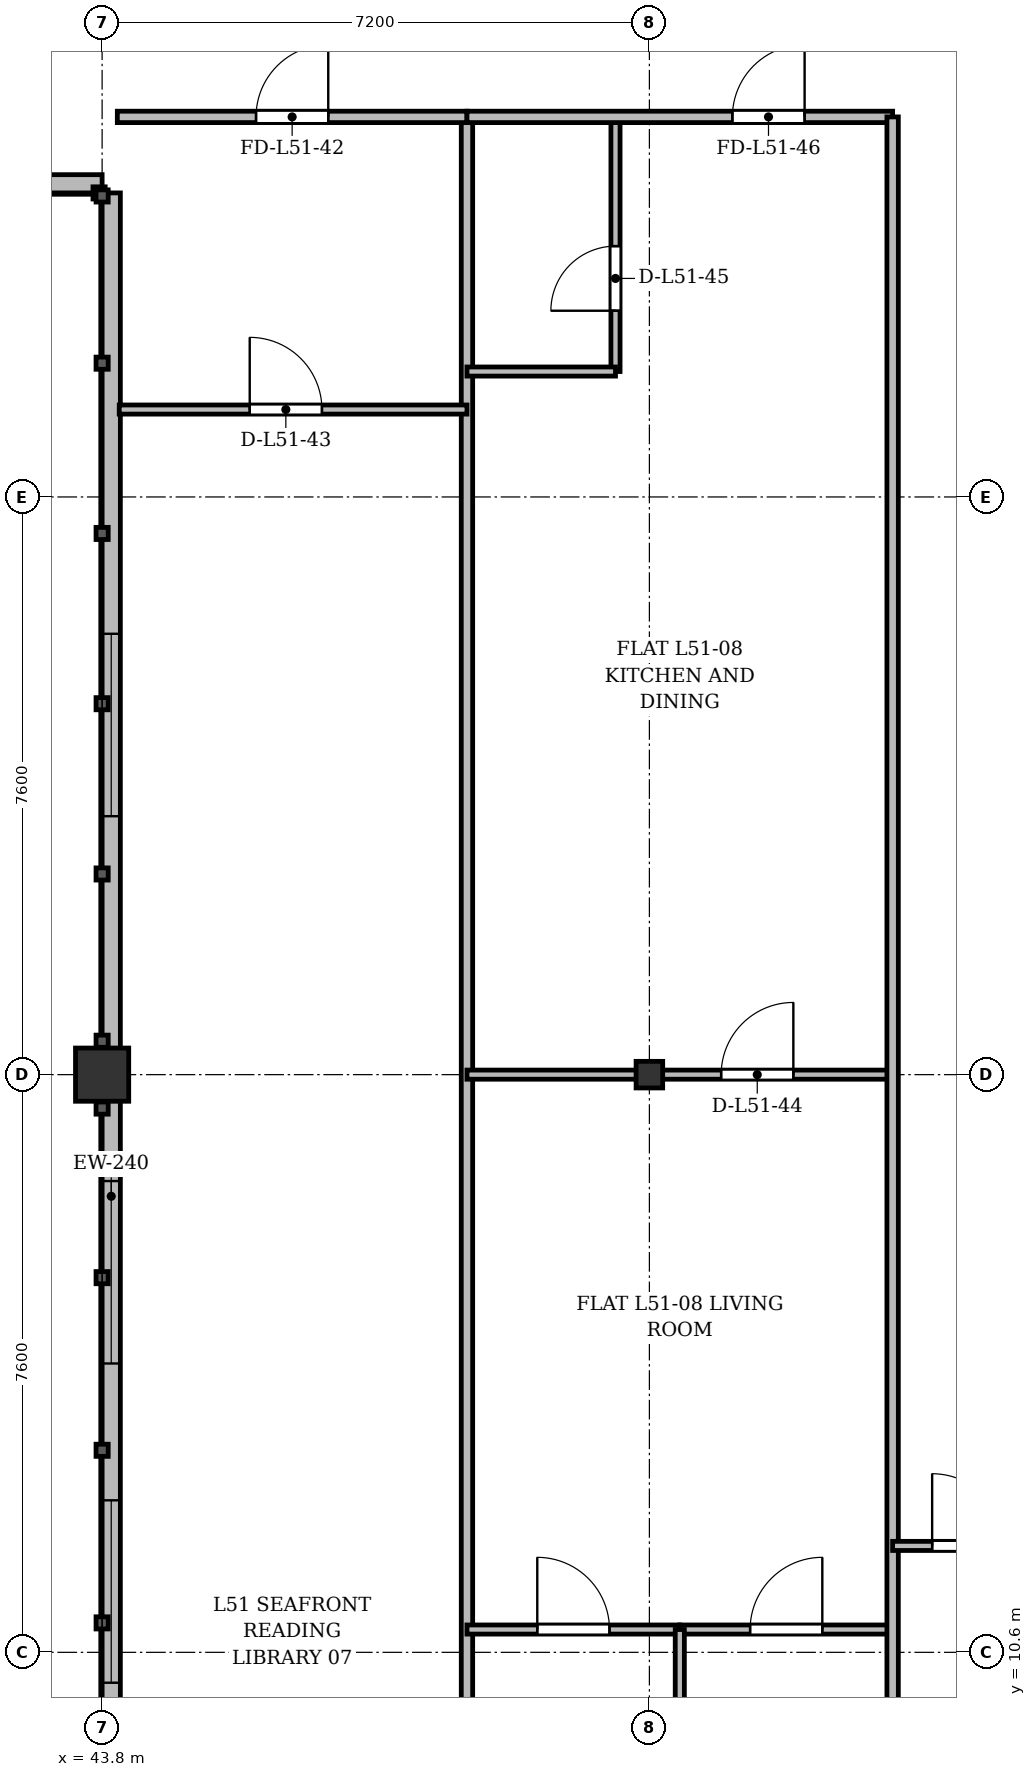
"""IFC4 building model, lengths in metres.
Left out: names, types, materials, properties, quantities, classifications, styles, units other than length and angle.
Written with IfcOpenShell. Run it as: python <this file> out.ifc"""

import sys

from ifc_helpers import new_model, si_unit, direction, frame, frame_2d, origin, origin_2d, place, context, subcontext, project, spatial, rectangle, i_section, extrude, source, transform, mapped, element, fill, save


model = new_model("IFC4")
c1 = context("Model", 3, precision=1e-05, world=origin(), true_north=direction((0.0, 1.0)))
c2 = subcontext(c1, "Body", "Model", "MODEL_VIEW")
j1 = project(units=[si_unit("LENGTHUNIT", "METRE"), si_unit("PLANEANGLEUNIT", "RADIAN")], contexts=[c1])
p1 = place(None, origin())
s1 = spatial("IfcSite", under=j1, at=p1, CompositionType="ELEMENT")
p2 = place(p1, origin())
s2 = spatial("IfcBuilding", under=s1, at=p2, CompositionType="ELEMENT")
p3 = place(p2, frame((0.0, 0.0, 197.7)))
s3 = spatial("IfcBuildingStorey", under=s2, at=p3, CompositionType="ELEMENT", Elevation=197.7)
m1 = source(origin(), c2, "Body", "SweptSolid", [
    extrude(rectangle(XDim=0.7, YDim=0.7, at=origin_2d()), origin(), (0.0, 0.0, 1.0), 3.6),
])
p4 = place(p3, frame((43.8, 18.2, 0.0), z_axis=(0.0, 0.0, 1.0), x_axis=(1.0, 0.0, 0.0)))
e1 = element("IfcColumn", 1, at=p4, inside=s3, PredefinedType="COLUMN", context=c2, shape_type="MappedRepresentation", body=[
    mapped(m1, transform((0.0, 0.0, 0.0), x_axis=(1.0, 0.0, 0.0), y_axis=(0.0, 1.0, 0.0), z_axis=(0.0, 0.0, 1.0), scale=1.0)),
])
m2 = source(origin(), c2, "Body", "SweptSolid", [
    extrude(i_section(OverallWidth=0.35, OverallDepth=0.35, WebThickness=0.018, FlangeThickness=0.028, at=origin_2d()), origin(), (0.0, 0.0, 1.0), 3.6),
])
p5 = place(p3, frame((51.0, 18.2, 0.0), z_axis=(0.0, 0.0, 1.0), x_axis=(1.0, 0.0, 0.0)))
e2 = element("IfcColumn", 2, at=p5, inside=s3, PredefinedType="COLUMN", context=c2, shape_type="MappedRepresentation", body=[
    mapped(m2, transform((0.0, 0.0, 0.0), x_axis=(1.0, 0.0, 0.0), y_axis=(0.0, 1.0, 0.0), z_axis=(0.0, 0.0, 1.0), scale=1.0)),
])
p6 = place(p3, frame((43.92, 3.4, 0.0), z_axis=(0.0, 0.0, 1.0), x_axis=(0.0, 1.0, 0.0)))
e3 = element("IfcWall", 3, at=p6, inside=s3, PredefinedType="SOLIDWALL", context=c2, shape_type="SweptSolid", body=[
    extrude(rectangle(XDim=26.4, YDim=0.24, at=frame_2d((13.2, 0.0))), origin(), (0.0, 0.0, 1.0), 2.86),
])
p7 = place(p6, frame((4.45, 0.0, 0.92)))
e4 = element("IfcOpeningElement", 4, at=p7, cuts=e3, PredefinedType="OPENING", context=c2, shape_type="SweptSolid", body=[
    extrude(rectangle(XDim=1.2, YDim=1.65, at=frame_2d((0.6, 0.825))), frame((0.0, 0.13, 0.0), z_axis=(0.0, -1.0, 0.0), x_axis=(1.0, 0.0, 0.0)), (0.0, 0.0, 1.0), 0.26),
])
p8 = place(p6, frame((6.8, 0.0, 0.92)))
e5 = element("IfcOpeningElement", 5, at=p8, cuts=e3, PredefinedType="OPENING", context=c2, shape_type="SweptSolid", body=[
    extrude(rectangle(XDim=2.4, YDim=1.84, at=frame_2d((1.2, 0.92))), frame((0.0, 0.13, 0.0), z_axis=(0.0, -1.0, 0.0), x_axis=(1.0, 0.0, 0.0)), (0.0, 0.0, 1.0), 0.26),
])
p9 = place(p6, frame((11.0, 0.0, 0.92)))
e6 = element("IfcOpeningElement", 6, at=p9, cuts=e3, PredefinedType="OPENING", context=c2, shape_type="SweptSolid", body=[
    extrude(rectangle(XDim=2.4, YDim=1.84, at=frame_2d((1.2, 0.92))), frame((0.0, 0.13, 0.0), z_axis=(0.0, -1.0, 0.0), x_axis=(1.0, 0.0, 0.0)), (0.0, 0.0, 1.0), 0.26),
])
p10 = place(p6, frame((18.2, 0.0, 0.92)))
e7 = element("IfcOpeningElement", 7, at=p10, cuts=e3, PredefinedType="OPENING", context=c2, shape_type="SweptSolid", body=[
    extrude(rectangle(XDim=2.4, YDim=1.84, at=frame_2d((1.2, 0.92))), frame((0.0, 0.13, 0.0), z_axis=(0.0, -1.0, 0.0), x_axis=(1.0, 0.0, 0.0)), (0.0, 0.0, 1.0), 0.26),
])
p11 = place(p3, frame((43.8, 29.92, 0.0), z_axis=(0.0, 0.0, 1.0), x_axis=(-1.0, 0.0, 0.0)))
e8 = element("IfcWall", 8, at=p11, inside=s3, PredefinedType="SOLIDWALL", context=c2, shape_type="SweptSolid", body=[
    extrude(rectangle(XDim=13.2, YDim=0.24, at=frame_2d((6.6, 0.0))), origin(), (0.0, 0.0, 1.0), 2.86),
])
p12 = place(p11, frame((5.5, 0.0, 0.9)))
e9 = element("IfcOpeningElement", 9, at=p12, cuts=e8, PredefinedType="OPENING", context=c2, shape_type="SweptSolid", body=[
    extrude(rectangle(XDim=2.2, YDim=1.8, at=frame_2d((1.1, 0.9))), frame((0.0, 0.13, 0.0), z_axis=(0.0, -1.0, 0.0), x_axis=(1.0, 0.0, 0.0)), (0.0, 0.0, 1.0), 0.26),
])
p13 = place(p3, frame((48.6, 3.625, 0.0), z_axis=(0.0, 0.0, 1.0), x_axis=(0.0, 1.0, 0.0)))
e10 = element("IfcWall", 10, at=p13, inside=s3, PredefinedType="PARTITIONING", context=c2, shape_type="SweptSolid", body=[
    extrude(rectangle(XDim=27.175, YDim=0.15, at=frame_2d((13.587, 0.0))), origin(), (0.0, 0.0, 1.0), 2.91),
])
p14 = place(p3, frame((44.0, 30.8, 0.0), z_axis=(0.0, 0.0, 1.0), x_axis=(1.0, 0.0, 0.0)))
e11 = element("IfcWall", 11, at=p14, inside=s3, PredefinedType="PARTITIONING", context=c2, shape_type="SweptSolid", body=[
    extrude(rectangle(XDim=4.6, YDim=0.15, at=frame_2d((2.3, 0.0))), origin(), (0.0, 0.0, 1.0), 3.36),
])
p15 = place(p14, frame((1.825, 0.0, 0.0)))
e12 = element("IfcOpeningElement", 12, at=p15, cuts=e11, PredefinedType="OPENING", context=c2, shape_type="SweptSolid", body=[
    extrude(rectangle(XDim=0.95, YDim=2.15, at=frame_2d((0.475, 1.075))), frame((0.0, 0.085, 0.0), z_axis=(0.0, -1.0, 0.0), x_axis=(1.0, 0.0, 0.0)), (0.0, 0.0, 1.0), 0.17),
])
p16 = place(p3, frame((44.025, 26.95, 0.0), z_axis=(0.0, 0.0, 1.0), x_axis=(1.0, 0.0, 0.0)))
e13 = element("IfcWall", 13, at=p16, inside=s3, PredefinedType="PARTITIONING", context=c2, shape_type="SweptSolid", body=[
    extrude(rectangle(XDim=4.575, YDim=0.12, at=frame_2d((2.288, 0.0))), origin(), (0.0, 0.0, 1.0), 3.36),
])
p17 = place(p16, frame((1.717, 0.0, 0.0)))
e14 = element("IfcOpeningElement", 14, at=p17, cuts=e13, PredefinedType="OPENING", context=c2, shape_type="SweptSolid", body=[
    extrude(rectangle(XDim=0.95, YDim=2.15, at=frame_2d((0.475, 1.075))), frame((0.0, 0.07, 0.0), z_axis=(0.0, -1.0, 0.0), x_axis=(1.0, 0.0, 0.0)), (0.0, 0.0, 1.0), 0.14),
])
p18 = place(p3, frame((48.6, 18.2, 0.0), z_axis=(0.0, 0.0, 1.0), x_axis=(1.0, 0.0, 0.0)))
e15 = element("IfcWall", 15, at=p18, inside=s3, PredefinedType="PARTITIONING", context=c2, shape_type="SweptSolid", body=[
    extrude(rectangle(XDim=5.6, YDim=0.12, at=frame_2d((2.8, 0.0))), origin(), (0.0, 0.0, 1.0), 2.91),
])
p19 = place(p18, frame((3.344, 0.0, 0.0)))
e16 = element("IfcOpeningElement", 16, at=p19, cuts=e15, PredefinedType="OPENING", context=c2, shape_type="SweptSolid", body=[
    extrude(rectangle(XDim=0.95, YDim=2.15, at=frame_2d((0.475, 1.075))), frame((0.0, 0.07, 0.0), z_axis=(0.0, -1.0, 0.0), x_axis=(1.0, 0.0, 0.0)), (0.0, 0.0, 1.0), 0.14),
])
p20 = place(p3, frame((50.554, 27.45, 0.0), z_axis=(0.0, 0.0, 1.0), x_axis=(0.0, 1.0, 0.0)))
e17 = element("IfcWall", 17, at=p20, inside=s3, PredefinedType="PARTITIONING", context=c2, shape_type="SweptSolid", body=[
    extrude(rectangle(XDim=3.35, YDim=0.12, at=frame_2d((1.675, 0.0))), origin(), (0.0, 0.0, 1.0), 3.36),
])
p21 = place(p20, frame((0.8, 0.0, 0.0)))
e18 = element("IfcOpeningElement", 18, at=p21, cuts=e17, PredefinedType="OPENING", context=c2, shape_type="SweptSolid", body=[
    extrude(rectangle(XDim=0.85, YDim=2.1, at=frame_2d((0.425, 1.05))), frame((0.0, 0.07, 0.0), z_axis=(0.0, -1.0, 0.0), x_axis=(1.0, 0.0, 0.0)), (0.0, 0.0, 1.0), 0.14),
])
p22 = place(p3, frame((48.6, 27.45, 0.0), z_axis=(0.0, 0.0, 1.0), x_axis=(1.0, 0.0, 0.0)))
e19 = element("IfcWall", 19, at=p22, inside=s3, PredefinedType="PARTITIONING", context=c2, shape_type="SweptSolid", body=[
    extrude(rectangle(XDim=1.954, YDim=0.12, at=frame_2d((0.977, 0.0))), origin(), (0.0, 0.0, 1.0), 3.36),
])
p23 = place(p3, frame((48.6, 30.8, 0.0), z_axis=(0.0, 0.0, 1.0), x_axis=(1.0, 0.0, 0.0)))
e20 = element("IfcWall", 20, at=p23, inside=s3, PredefinedType="PARTITIONING", context=c2, shape_type="SweptSolid", body=[
    extrude(rectangle(XDim=5.6, YDim=0.15, at=frame_2d((2.8, 0.0))), origin(), (0.0, 0.0, 1.0), 2.86),
])
p24 = place(p23, frame((3.492, 0.0, 0.0)))
e21 = element("IfcOpeningElement", 21, at=p24, cuts=e20, PredefinedType="OPENING", context=c2, shape_type="SweptSolid", body=[
    extrude(rectangle(XDim=0.95, YDim=2.15, at=frame_2d((0.475, 1.075))), frame((0.0, 0.085, 0.0), z_axis=(0.0, -1.0, 0.0), x_axis=(1.0, 0.0, 0.0)), (0.0, 0.0, 1.0), 0.17),
])
p25 = place(p3, frame((48.6, 10.9, 0.0), z_axis=(0.0, 0.0, 1.0), x_axis=(1.0, 0.0, 0.0)))
e22 = element("IfcWall", 22, at=p25, inside=s3, PredefinedType="PARTITIONING", context=c2, shape_type="SweptSolid", body=[
    extrude(rectangle(XDim=2.8, YDim=0.12, at=frame_2d((1.4, 0.0))), origin(), (0.0, 0.0, 1.0), 2.86),
])
p26 = place(p25, frame((0.925, 0.0, 0.0)))
e23 = element("IfcOpeningElement", 23, at=p26, cuts=e22, PredefinedType="OPENING", context=c2, shape_type="SweptSolid", body=[
    extrude(rectangle(XDim=0.95, YDim=2.15, at=frame_2d((0.475, 1.075))), frame((0.0, 0.07, 0.0), z_axis=(0.0, -1.0, 0.0), x_axis=(1.0, 0.0, 0.0)), (0.0, 0.0, 1.0), 0.14),
])
p27 = place(p3, frame((51.4, 10.9, 0.0), z_axis=(0.0, 0.0, 1.0), x_axis=(1.0, 0.0, 0.0)))
e24 = element("IfcWall", 24, at=p27, inside=s3, PredefinedType="PARTITIONING", context=c2, shape_type="SweptSolid", body=[
    extrude(rectangle(XDim=2.8, YDim=0.12, at=frame_2d((1.4, 0.0))), origin(), (0.0, 0.0, 1.0), 3.06),
])
p28 = place(p27, frame((0.925, 0.0, 0.0)))
e25 = element("IfcOpeningElement", 25, at=p28, cuts=e24, PredefinedType="OPENING", context=c2, shape_type="SweptSolid", body=[
    extrude(rectangle(XDim=0.95, YDim=2.15, at=frame_2d((0.475, 1.075))), frame((0.0, 0.07, 0.0), z_axis=(0.0, -1.0, 0.0), x_axis=(1.0, 0.0, 0.0)), (0.0, 0.0, 1.0), 0.14),
])
p29 = place(p3, frame((51.4, 3.625, 0.0), z_axis=(0.0, 0.0, 1.0), x_axis=(0.0, 1.0, 0.0)))
e26 = element("IfcWall", 26, at=p29, inside=s3, PredefinedType="PARTITIONING", context=c2, shape_type="SweptSolid", body=[
    extrude(rectangle(XDim=7.275, YDim=0.12, at=frame_2d((3.637, 0.0))), origin(), (0.0, 0.0, 1.0), 2.91),
])
p30 = place(p3, frame((54.2, 3.625, 0.0), z_axis=(0.0, 0.0, 1.0), x_axis=(0.0, 1.0, 0.0)))
e27 = element("IfcWall", 27, at=p30, inside=s3, PredefinedType="PARTITIONING", context=c2, shape_type="SweptSolid", body=[
    extrude(rectangle(XDim=27.175, YDim=0.15, at=frame_2d((13.587, 0.0))), origin(), (0.0, 0.0, 1.0), 2.91),
])
p31 = place(p3, frame((54.2, 12.0, 0.0), z_axis=(0.0, 0.0, 1.0), x_axis=(1.0, 0.0, 0.0)))
e28 = element("IfcWall", 28, at=p31, inside=s3, PredefinedType="PARTITIONING", context=c2, shape_type="SweptSolid", body=[
    extrude(rectangle(XDim=2.0, YDim=0.12, at=frame_2d((1.0, 0.0))), origin(), (0.0, 0.0, 1.0), 3.36),
])
p32 = place(p31, frame((0.52, 0.0, 0.0)))
e29 = element("IfcOpeningElement", 29, at=p32, cuts=e28, PredefinedType="OPENING", context=c2, shape_type="SweptSolid", body=[
    extrude(rectangle(XDim=0.95, YDim=2.15, at=frame_2d((0.475, 1.075))), frame((0.0, 0.07, 0.0), z_axis=(0.0, -1.0, 0.0), x_axis=(1.0, 0.0, 0.0)), (0.0, 0.0, 1.0), 0.14),
])
m3 = source(origin(), c2, "Body", "SweptSolid", [
    extrude(rectangle(XDim=2.4, YDim=1.84, at=frame_2d((1.2, 0.92))), frame((0.0, 0.03, 0.0), z_axis=(0.0, -1.0, 0.0), x_axis=(1.0, 0.0, 0.0)), (0.0, 0.0, 1.0), 0.06),
])
p33 = place(p8, origin())
e30 = element("IfcWindow", 30, at=p33, inside=s3, PartitioningType="SINGLE_PANEL", PredefinedType="WINDOW", context=c2, shape_type="MappedRepresentation", body=[
    mapped(m3, transform((0.0, 0.0, 0.0), x_axis=(1.0, 0.0, 0.0), y_axis=(0.0, 1.0, 0.0), z_axis=(0.0, 0.0, 1.0), scale=1.0)),
])
fill(e5, e30)
p34 = place(p9, origin())
e31 = element("IfcWindow", 31, at=p34, inside=s3, PartitioningType="SINGLE_PANEL", PredefinedType="WINDOW", context=c2, shape_type="MappedRepresentation", body=[
    mapped(m3, transform((0.0, 0.0, 0.0), x_axis=(1.0, 0.0, 0.0), y_axis=(0.0, 1.0, 0.0), z_axis=(0.0, 0.0, 1.0), scale=1.0)),
])
fill(e6, e31)
p35 = place(p10, origin())
e32 = element("IfcWindow", 32, at=p35, inside=s3, PartitioningType="SINGLE_PANEL", PredefinedType="WINDOW", context=c2, shape_type="MappedRepresentation", body=[
    mapped(m3, transform((0.0, 0.0, 0.0), x_axis=(1.0, 0.0, 0.0), y_axis=(0.0, 1.0, 0.0), z_axis=(0.0, 0.0, 1.0), scale=1.0)),
])
fill(e7, e32)
m4 = source(origin(), c2, "Body", "SweptSolid", [
    extrude(rectangle(XDim=0.95, YDim=2.15, at=frame_2d((0.475, 1.075))), frame((0.0, 0.025, 0.0), z_axis=(0.0, -1.0, 0.0), x_axis=(1.0, 0.0, 0.0)), (0.0, 0.0, 1.0), 0.05),
])
p36 = place(p15, origin())
e33 = element("IfcDoor", 33, at=p36, inside=s3, OperationType="SINGLE_SWING_RIGHT", PredefinedType="DOOR", context=c2, shape_type="MappedRepresentation", body=[
    mapped(m4, transform((0.0, 0.0, 0.0), x_axis=(1.0, 0.0, 0.0), y_axis=(0.0, 1.0, 0.0), z_axis=(0.0, 0.0, 1.0), scale=1.0)),
])
fill(e12, e33)
p37 = place(p17, origin())
e34 = element("IfcDoor", 34, at=p37, inside=s3, OperationType="SINGLE_SWING_LEFT", PredefinedType="DOOR", context=c2, shape_type="MappedRepresentation", body=[
    mapped(m4, transform((0.0, 0.0, 0.0), x_axis=(1.0, 0.0, 0.0), y_axis=(0.0, 1.0, 0.0), z_axis=(0.0, 0.0, 1.0), scale=1.0)),
])
fill(e14, e34)
p38 = place(p19, origin())
e35 = element("IfcDoor", 35, at=p38, inside=s3, OperationType="SINGLE_SWING_RIGHT", PredefinedType="DOOR", context=c2, shape_type="MappedRepresentation", body=[
    mapped(m4, transform((0.0, 0.0, 0.0), x_axis=(1.0, 0.0, 0.0), y_axis=(0.0, 1.0, 0.0), z_axis=(0.0, 0.0, 1.0), scale=1.0)),
])
fill(e16, e35)
m5 = source(origin(), c2, "Body", "SweptSolid", [
    extrude(rectangle(XDim=0.85, YDim=2.1, at=frame_2d((0.425, 1.05))), frame((0.0, 0.025, 0.0), z_axis=(0.0, -1.0, 0.0), x_axis=(1.0, 0.0, 0.0)), (0.0, 0.0, 1.0), 0.05),
])
p39 = place(p21, origin())
e36 = element("IfcDoor", 36, at=p39, inside=s3, OperationType="SINGLE_SWING_LEFT", PredefinedType="DOOR", context=c2, shape_type="MappedRepresentation", body=[
    mapped(m5, transform((0.0, 0.0, 0.0), x_axis=(1.0, 0.0, 0.0), y_axis=(0.0, 1.0, 0.0), z_axis=(0.0, 0.0, 1.0), scale=1.0)),
])
fill(e18, e36)
p40 = place(p24, origin())
e37 = element("IfcDoor", 37, at=p40, inside=s3, OperationType="SINGLE_SWING_RIGHT", PredefinedType="DOOR", context=c2, shape_type="MappedRepresentation", body=[
    mapped(m4, transform((0.0, 0.0, 0.0), x_axis=(1.0, 0.0, 0.0), y_axis=(0.0, 1.0, 0.0), z_axis=(0.0, 0.0, 1.0), scale=1.0)),
])
fill(e21, e37)
p41 = place(p26, origin())
e38 = element("IfcDoor", 38, at=p41, inside=s3, OperationType="SINGLE_SWING_LEFT", PredefinedType="DOOR", context=c2, shape_type="MappedRepresentation", body=[
    mapped(m4, transform((0.0, 0.0, 0.0), x_axis=(1.0, 0.0, 0.0), y_axis=(0.0, 1.0, 0.0), z_axis=(0.0, 0.0, 1.0), scale=1.0)),
])
fill(e23, e38)
p42 = place(p28, origin())
e39 = element("IfcDoor", 39, at=p42, inside=s3, OperationType="SINGLE_SWING_RIGHT", PredefinedType="DOOR", context=c2, shape_type="MappedRepresentation", body=[
    mapped(m4, transform((0.0, 0.0, 0.0), x_axis=(1.0, 0.0, 0.0), y_axis=(0.0, 1.0, 0.0), z_axis=(0.0, 0.0, 1.0), scale=1.0)),
])
fill(e25, e39)
p43 = place(p32, origin())
e40 = element("IfcDoor", 40, at=p43, inside=s3, OperationType="SINGLE_SWING_LEFT", PredefinedType="DOOR", context=c2, shape_type="MappedRepresentation", body=[
    mapped(m4, transform((0.0, 0.0, 0.0), x_axis=(1.0, 0.0, 0.0), y_axis=(0.0, 1.0, 0.0), z_axis=(0.0, 0.0, 1.0), scale=1.0)),
])
fill(e29, e40)
save(model, sys.argv[1])
